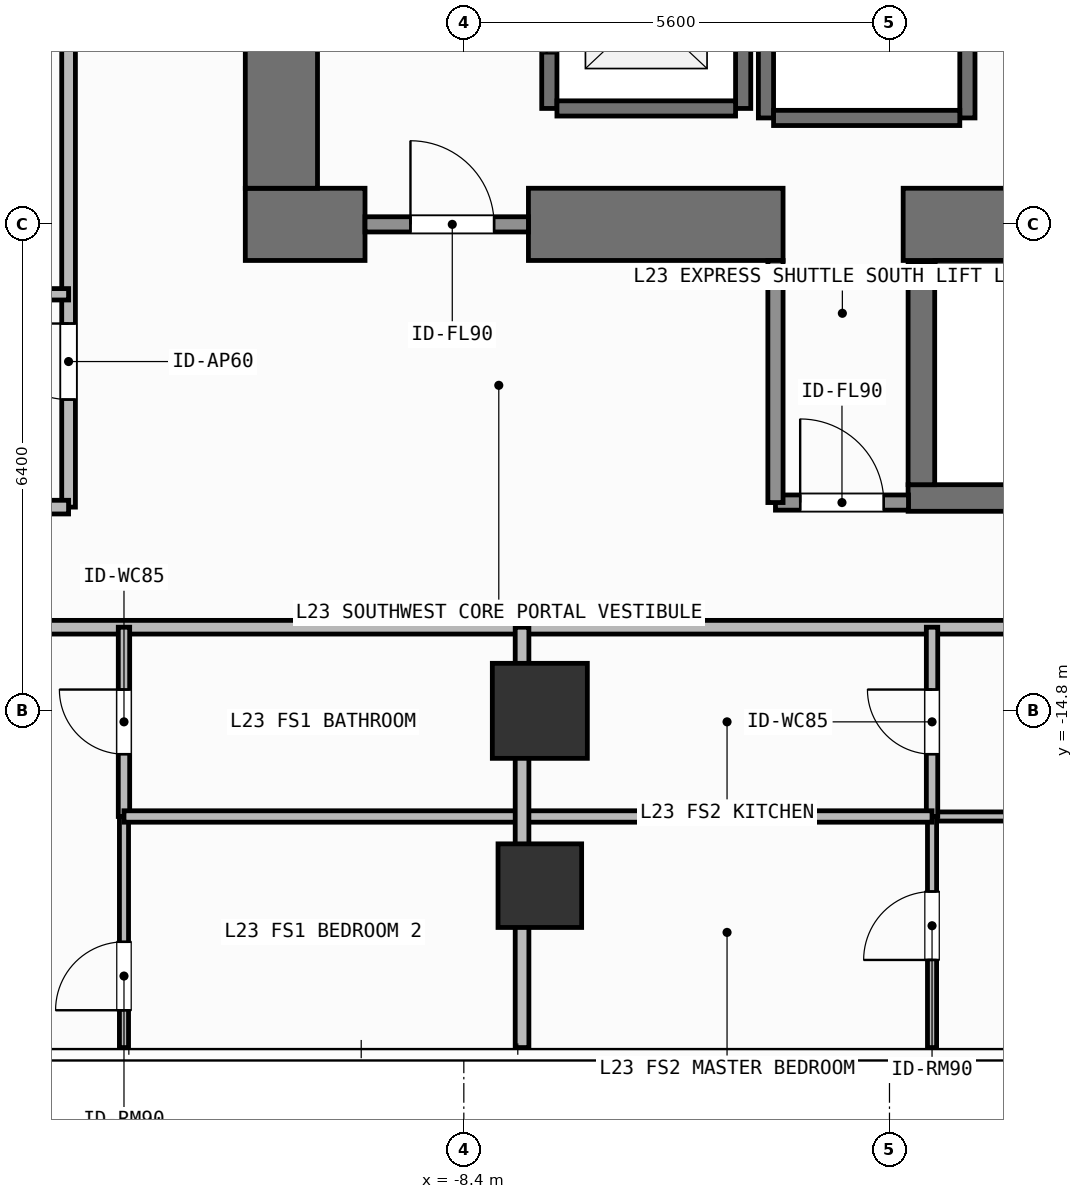
"""IFC4 building model, lengths in metres.
Left out: names, types, materials, properties, quantities, classifications, styles, units other than length and angle.
Written with IfcOpenShell. Run it as: python <this file> out.ifc"""

import sys

from ifc_helpers import new_model, si_unit, direction, frame, frame_2d, origin, origin_2d, place, context, subcontext, project, spatial, rectangle, extrude, element, fill, save


model = new_model("IFC4")
c1 = context("Model", 3, precision=1e-05, world=origin(), true_north=direction((0.0, 1.0)))
c2 = subcontext(c1, "Body", "Model", "MODEL_VIEW")
j1 = project(units=[si_unit("LENGTHUNIT", "METRE"), si_unit("PLANEANGLEUNIT", "RADIAN")], contexts=[c1])
p1 = place(None, origin())
s1 = spatial("IfcSite", under=j1, at=p1, CompositionType="ELEMENT")
p2 = place(p1, origin())
s2 = spatial("IfcBuilding", under=s1, at=p2, CompositionType="ELEMENT")
p3 = place(p2, frame((0.0, 0.0, 93.0)))
s3 = spatial("IfcBuildingStorey", under=s2, at=p3, CompositionType="ELEMENT", Elevation=93.0)
p4 = place(p3, frame((-11.275, -8.4, 0.0), z_axis=(0.0, 0.0, 1.0), x_axis=(1.0, 0.0, 0.0)))
e1 = element("IfcWall", 1, at=p4, inside=s3, PredefinedType="SHEAR", context=c2, shape_type="SweptSolid", body=[
    extrude(rectangle(XDim=1.575, YDim=0.95, at=frame_2d((0.788, 0.0))), origin(), (0.0, 0.0, 1.0), 3.9),
])
p5 = place(p3, frame((-7.55, -8.4, 0.0), z_axis=(0.0, 0.0, 1.0), x_axis=(1.0, 0.0, 0.0)))
e2 = element("IfcWall", 2, at=p5, inside=s3, PredefinedType="SHEAR", context=c2, shape_type="SweptSolid", body=[
    extrude(rectangle(XDim=3.35, YDim=0.95, at=frame_2d((1.675, 0.0))), origin(), (0.0, 0.0, 1.0), 3.9),
])
p6 = place(p3, frame((-2.62, -8.4, 0.0), z_axis=(0.0, 0.0, 1.0), x_axis=(1.0, 0.0, 0.0)))
e3 = element("IfcWall", 3, at=p6, inside=s3, PredefinedType="SHEAR", context=c2, shape_type="SweptSolid", body=[
    extrude(rectangle(XDim=7.27, YDim=0.95, at=frame_2d((3.635, 0.0))), origin(), (0.0, 0.0, 1.0), 3.9),
])
p7 = place(p3, frame((-10.8, -7.925, 0.0), z_axis=(0.0, 0.0, 1.0), x_axis=(0.0, 1.0, 0.0)))
e4 = element("IfcWall", 4, at=p7, inside=s3, PredefinedType="SHEAR", context=c2, shape_type="SweptSolid", body=[
    extrude(rectangle(XDim=15.85, YDim=0.95, at=frame_2d((7.925, 0.0))), origin(), (0.0, 0.0, 1.0), 3.9),
])
p8 = place(p3, frame((-2.555, -12.0, 0.0), z_axis=(0.0, 0.0, 1.0), x_axis=(1.0, 0.0, 0.0)))
e5 = element("IfcWall", 5, at=p8, inside=s3, PredefinedType="SHEAR", context=c2, shape_type="SweptSolid", body=[
    extrude(rectangle(XDim=7.31, YDim=0.35, at=frame_2d((3.655, 0.0))), origin(), (0.0, 0.0, 1.0), 3.9),
])
p9 = place(p3, frame((-2.2, -8.95, 0.0), z_axis=(0.0, 0.0, 1.0), x_axis=(1.0, 0.0, 0.0)))
e6 = element("IfcWall", 6, at=p9, inside=s3, PredefinedType="SHEAR", context=c2, shape_type="SweptSolid", body=[
    extrude(rectangle(XDim=6.6, YDim=0.15, at=frame_2d((3.3, 0.0))), origin(), (0.0, 0.0, 1.0), 3.9),
])
p10 = place(p3, frame((-2.38, -11.825, 0.0), z_axis=(0.0, 0.0, 1.0), x_axis=(0.0, 1.0, 0.0)))
e7 = element("IfcWall", 7, at=p10, inside=s3, PredefinedType="SHEAR", context=c2, shape_type="SweptSolid", body=[
    extrude(rectangle(XDim=2.925, YDim=0.35, at=frame_2d((1.462, 0.0))), origin(), (0.0, 0.0, 1.0), 3.9),
])
p11 = place(p3, frame((-7.4, -14.8, 0.0), z_axis=(0.0, 0.0, 1.0), x_axis=(1.0, 0.0, 0.0)))
e8 = element("IfcColumn", 8, at=p11, inside=s3, PredefinedType="COLUMN", context=c2, shape_type="SweptSolid", body=[
    extrude(rectangle(XDim=1.25, YDim=1.25, at=origin_2d()), origin(), (0.0, 0.0, 1.0), 3.9),
])
p12 = place(p3, frame((-7.4, -17.1, 0.0), z_axis=(0.0, 0.0, 1.0), x_axis=(1.0, 0.0, 0.0)))
e9 = element("IfcColumn", 9, at=p12, inside=s3, PredefinedType="COLUMN", context=c2, shape_type="SweptSolid", body=[
    extrude(rectangle(XDim=1.1, YDim=1.1, at=origin_2d()), origin(), (0.0, 0.0, 1.0), 3.9),
])
p13 = place(p3, frame((-7.275, -6.875, 0.0), z_axis=(0.0, 0.0, 1.0), x_axis=(0.0, 1.0, 0.0)))
e10 = element("IfcWall", 10, at=p13, inside=s3, PredefinedType="SHEAR", context=c2, shape_type="SweptSolid", body=[
    extrude(rectangle(XDim=2.55, YDim=0.2, at=frame_2d((1.275, 0.0))), origin(), (0.0, 0.0, 1.0), 3.68),
])
p14 = place(p13, frame((0.725, 0.0, 0.0)))
e11 = element("IfcOpeningElement", 11, at=p14, cuts=e10, PredefinedType="OPENING", context=c2, shape_type="SweptSolid", body=[
    extrude(rectangle(XDim=1.1, YDim=2.2, at=frame_2d((0.55, 1.1))), frame((0.0, 0.11, 0.0), z_axis=(0.0, -1.0, 0.0), x_axis=(1.0, 0.0, 0.0)), (0.0, 0.0, 1.0), 0.22),
])
p15 = place(p3, frame((-4.725, -6.875, 0.0), z_axis=(0.0, 0.0, 1.0), x_axis=(0.0, 1.0, 0.0)))
e12 = element("IfcWall", 12, at=p15, inside=s3, PredefinedType="SHEAR", context=c2, shape_type="SweptSolid", body=[
    extrude(rectangle(XDim=2.55, YDim=0.2, at=frame_2d((1.275, 0.0))), origin(), (0.0, 0.0, 1.0), 3.68),
])
p16 = place(p3, frame((-7.175, -6.875, 0.0), z_axis=(0.0, 0.0, 1.0), x_axis=(1.0, 0.0, 0.0)))
e13 = element("IfcWall", 13, at=p16, inside=s3, PredefinedType="SHEAR", context=c2, shape_type="SweptSolid", body=[
    extrude(rectangle(XDim=2.35, YDim=0.2, at=frame_2d((1.175, 0.0))), origin(), (0.0, 0.0, 1.0), 3.68),
])
for number, where, z_axis, x_axis in (
    (14, (-4.425, -7.0, 0.0), (0.0, 0.0, 1.0), (0.0, 1.0, 0.0)),
    (15, (-1.775, -7.0, 0.0), (0.0, 0.0, 1.0), (0.0, 1.0, 0.0)),
):
    element("IfcWall", number, at=place(p3, frame(where, z_axis=z_axis, x_axis=x_axis)), inside=s3, PredefinedType="SHEAR", context=c2, shape_type="SweptSolid", body=[
        extrude(rectangle(XDim=2.8, YDim=0.2, at=frame_2d((1.4, 0.0))), origin(), (0.0, 0.0, 1.0), 3.68),
    ])
p17 = place(p3, frame((-4.325, -7.0, 0.0), z_axis=(0.0, 0.0, 1.0), x_axis=(1.0, 0.0, 0.0)))
e16 = element("IfcWall", 16, at=p17, inside=s3, PredefinedType="SHEAR", context=c2, shape_type="SweptSolid", body=[
    extrude(rectangle(XDim=2.45, YDim=0.2, at=frame_2d((1.225, 0.0))), origin(), (0.0, 0.0, 1.0), 3.68),
])
p18 = place(p3, frame((-9.7, -8.4, 0.0), z_axis=(0.0, 0.0, 1.0), x_axis=(1.0, 0.0, 0.0)))
e17 = element("IfcWall", 17, at=p18, inside=s3, PredefinedType="SOLIDWALL", context=c2, shape_type="SweptSolid", body=[
    extrude(rectangle(XDim=2.15, YDim=0.2, at=frame_2d((1.075, 0.0))), origin(), (0.0, 0.0, 1.0), 2.72),
])
p19 = place(p18, frame((0.598, 0.0, 0.0)))
e18 = element("IfcOpeningElement", 18, at=p19, cuts=e17, PredefinedType="OPENING", context=c2, shape_type="SweptSolid", body=[
    extrude(rectangle(XDim=1.1, YDim=2.15, at=frame_2d((0.55, 1.075))), frame((0.0, 0.11, 0.0), z_axis=(0.0, -1.0, 0.0), x_axis=(1.0, 0.0, 0.0)), (0.0, 0.0, 1.0), 0.22),
])
p20 = place(p3, frame((-4.3, -12.06, 0.0), z_axis=(0.0, 0.0, 1.0), x_axis=(1.0, 0.0, 0.0)))
e19 = element("IfcWall", 19, at=p20, inside=s3, PredefinedType="SOLIDWALL", context=c2, shape_type="SweptSolid", body=[
    extrude(rectangle(XDim=1.75, YDim=0.2, at=frame_2d((0.875, 0.0))), origin(), (0.0, 0.0, 1.0), 3.68),
])
p21 = place(p20, frame((0.325, 0.0, 0.0)))
e20 = element("IfcOpeningElement", 20, at=p21, cuts=e19, PredefinedType="OPENING", context=c2, shape_type="SweptSolid", body=[
    extrude(rectangle(XDim=1.1, YDim=2.15, at=frame_2d((0.55, 1.075))), frame((0.0, 0.11, 0.0), z_axis=(0.0, -1.0, 0.0), x_axis=(1.0, 0.0, 0.0)), (0.0, 0.0, 1.0), 0.22),
])
p22 = place(p3, frame((-24.42, -13.7, 0.0), z_axis=(0.0, 0.0, 1.0), x_axis=(1.0, 0.0, 0.0)))
e21 = element("IfcWall", 21, at=p22, inside=s3, PredefinedType="PARTITIONING", context=c2, shape_type="SweptSolid", body=[
    extrude(rectangle(XDim=16.786, YDim=0.18, at=frame_2d((8.393, 0.0))), origin(), (0.0, 0.0, 1.0), 3.68),
])
p23 = place(p22, frame((7.174, 0.0, 0.0)))
e22 = element("IfcOpeningElement", 22, at=p23, cuts=e21, PredefinedType="OPENING", context=c2, shape_type="SweptSolid", body=[
    extrude(rectangle(XDim=1.0, YDim=2.2, at=frame_2d((0.5, 1.1))), frame((0.0, 0.1, 0.0), z_axis=(0.0, -1.0, 0.0), x_axis=(1.0, 0.0, 0.0)), (0.0, 0.0, 1.0), 0.2),
])
p24 = place(p3, frame((-12.871, -16.19, 0.0), z_axis=(0.0, 0.0, 1.0), x_axis=(0.0, 1.0, 0.0)))
e23 = element("IfcWall", 23, at=p24, inside=s3, PredefinedType="PARTITIONING", context=c2, shape_type="SweptSolid", body=[
    extrude(rectangle(XDim=2.49, YDim=0.15, at=frame_2d((1.245, 0.0))), origin(), (0.0, 0.0, 1.0), 3.68),
])
p25 = place(p24, frame((0.82, 0.0, 0.0)))
e24 = element("IfcOpeningElement", 24, at=p25, cuts=e23, PredefinedType="OPENING", context=c2, shape_type="SweptSolid", body=[
    extrude(rectangle(XDim=0.85, YDim=2.1, at=frame_2d((0.425, 1.05))), frame((0.0, 0.085, 0.0), z_axis=(0.0, -1.0, 0.0), x_axis=(1.0, 0.0, 0.0)), (0.0, 0.0, 1.0), 0.17),
])
p26 = place(p3, frame((-12.871, -19.23, 0.0), z_axis=(0.0, 0.0, 1.0), x_axis=(0.0, 1.0, 0.0)))
e25 = element("IfcWall", 25, at=p26, inside=s3, PredefinedType="PARTITIONING", context=c2, shape_type="SweptSolid", body=[
    extrude(rectangle(XDim=3.04, YDim=0.12, at=frame_2d((1.52, 0.0))), origin(), (0.0, 0.0, 1.0), 3.68),
])
p27 = place(p26, frame((0.491, 0.0, 0.0)))
e26 = element("IfcOpeningElement", 26, at=p27, cuts=e25, PredefinedType="OPENING", context=c2, shape_type="SweptSolid", body=[
    extrude(rectangle(XDim=0.9, YDim=2.1, at=frame_2d((0.45, 1.05))), frame((0.0, 0.07, 0.0), z_axis=(0.0, -1.0, 0.0), x_axis=(1.0, 0.0, 0.0)), (0.0, 0.0, 1.0), 0.14),
])
p28 = place(p3, frame((-7.634, -13.7, 0.0), z_axis=(0.0, 0.0, 1.0), x_axis=(1.0, 0.0, 0.0)))
e27 = element("IfcWall", 27, at=p28, inside=s3, PredefinedType="PARTITIONING", context=c2, shape_type="SweptSolid", body=[
    extrude(rectangle(XDim=26.254, YDim=0.18, at=frame_2d((13.127, 0.0))), origin(), (0.0, 0.0, 1.0), 3.68),
])
p29 = place(p28, frame((12.178, 0.0, 0.0)))
e28 = element("IfcOpeningElement", 28, at=p29, cuts=e27, PredefinedType="OPENING", context=c2, shape_type="SweptSolid", body=[
    extrude(rectangle(XDim=1.0, YDim=2.2, at=frame_2d((0.5, 1.1))), frame((0.0, 0.1, 0.0), z_axis=(0.0, -1.0, 0.0), x_axis=(1.0, 0.0, 0.0)), (0.0, 0.0, 1.0), 0.2),
])
p30 = place(p3, frame((-2.24, -16.19, 0.0), z_axis=(0.0, 0.0, 1.0), x_axis=(1.0, 0.0, 0.0)))
e29 = element("IfcWall", 29, at=p30, inside=s3, PredefinedType="PARTITIONING", context=c2, shape_type="SweptSolid", body=[
    extrude(rectangle(XDim=14.654, YDim=0.12, at=frame_2d((7.327, 0.0))), origin(), (0.0, 0.0, 1.0), 3.68),
])
p31 = place(p30, frame((6.787, 0.0, 0.0)))
e30 = element("IfcOpeningElement", 30, at=p31, cuts=e29, PredefinedType="OPENING", context=c2, shape_type="SweptSolid", body=[
    extrude(rectangle(XDim=0.9, YDim=2.1, at=frame_2d((0.45, 1.05))), frame((0.0, 0.07, 0.0), z_axis=(0.0, -1.0, 0.0), x_axis=(1.0, 0.0, 0.0)), (0.0, 0.0, 1.0), 0.14),
])
p32 = place(p3, frame((-2.24, -16.19, 0.0), z_axis=(0.0, 0.0, 1.0), x_axis=(0.0, 1.0, 0.0)))
e31 = element("IfcWall", 31, at=p32, inside=s3, PredefinedType="PARTITIONING", context=c2, shape_type="SweptSolid", body=[
    extrude(rectangle(XDim=2.49, YDim=0.15, at=frame_2d((1.245, 0.0))), origin(), (0.0, 0.0, 1.0), 3.68),
])
p33 = place(p32, frame((0.82, 0.0, 0.0)))
e32 = element("IfcOpeningElement", 32, at=p33, cuts=e31, PredefinedType="OPENING", context=c2, shape_type="SweptSolid", body=[
    extrude(rectangle(XDim=0.85, YDim=2.1, at=frame_2d((0.425, 1.05))), frame((0.0, 0.085, 0.0), z_axis=(0.0, -1.0, 0.0), x_axis=(1.0, 0.0, 0.0)), (0.0, 0.0, 1.0), 0.17),
])
p34 = place(p3, frame((-2.24, -19.23, 0.0), z_axis=(0.0, 0.0, 1.0), x_axis=(0.0, 1.0, 0.0)))
e33 = element("IfcWall", 33, at=p34, inside=s3, PredefinedType="PARTITIONING", context=c2, shape_type="SweptSolid", body=[
    extrude(rectangle(XDim=3.04, YDim=0.12, at=frame_2d((1.52, 0.0))), origin(), (0.0, 0.0, 1.0), 3.68),
])
p35 = place(p34, frame((1.153, 0.0, 0.0)))
e34 = element("IfcOpeningElement", 34, at=p35, cuts=e33, PredefinedType="OPENING", context=c2, shape_type="SweptSolid", body=[
    extrude(rectangle(XDim=0.9, YDim=2.1, at=frame_2d((0.45, 1.05))), frame((0.0, 0.07, 0.0), z_axis=(0.0, -1.0, 0.0), x_axis=(1.0, 0.0, 0.0)), (0.0, 0.0, 1.0), 0.14),
])
p36 = place(p3, frame((-13.6, -12.12, 0.0), z_axis=(0.0, 0.0, 1.0), x_axis=(0.0, 1.0, 0.0)))
e35 = element("IfcWall", 35, at=p36, inside=s3, PredefinedType="PARTITIONING", context=c2, shape_type="SweptSolid", body=[
    extrude(rectangle(XDim=9.389, YDim=0.18, at=frame_2d((4.695, 0.0))), origin(), (0.0, 0.0, 1.0), 3.68),
])
p37 = place(p36, frame((1.415, 0.0, 0.0)))
e36 = element("IfcOpeningElement", 36, at=p37, cuts=e35, PredefinedType="OPENING", context=c2, shape_type="SweptSolid", body=[
    extrude(rectangle(XDim=1.0, YDim=2.2, at=frame_2d((0.5, 1.1))), frame((0.0, 0.1, 0.0), z_axis=(0.0, -1.0, 0.0), x_axis=(1.0, 0.0, 0.0)), (0.0, 0.0, 1.0), 0.2),
])
p38 = place(p3, frame((-16.863, -9.32, 0.0), z_axis=(0.0, 0.0, 1.0), x_axis=(1.0, 0.0, 0.0)))
e37 = element("IfcWall", 37, at=p38, inside=s3, PredefinedType="PARTITIONING", context=c2, shape_type="SweptSolid", body=[
    extrude(rectangle(XDim=3.263, YDim=0.15, at=frame_2d((1.631, 0.0))), origin(), (0.0, 0.0, 1.0), 3.68),
])
p39 = place(p38, frame((0.509, 0.0, 0.0)))
e38 = element("IfcOpeningElement", 38, at=p39, cuts=e37, PredefinedType="OPENING", context=c2, shape_type="SweptSolid", body=[
    extrude(rectangle(XDim=0.85, YDim=2.1, at=frame_2d((0.425, 1.05))), frame((0.0, 0.085, 0.0), z_axis=(0.0, -1.0, 0.0), x_axis=(1.0, 0.0, 0.0)), (0.0, 0.0, 1.0), 0.17),
])
p40 = place(p3, frame((-4.3, -12.06, 0.0), z_axis=(0.0, 0.0, 1.0), x_axis=(0.0, 1.0, 0.0)))
e39 = element("IfcWall", 39, at=p40, inside=s3, PredefinedType="SOLIDWALL", context=c2, shape_type="SweptSolid", body=[
    extrude(rectangle(XDim=3.185, YDim=0.2, at=frame_2d((1.593, 0.0))), origin(), (0.0, 0.0, 1.0), 3.68),
])
p41 = place(p3, frame((-12.871, -16.19, 0.0), z_axis=(0.0, 0.0, 1.0), x_axis=(1.0, 0.0, 0.0)))
e40 = element("IfcWall", 40, at=p41, inside=s3, PredefinedType="PARTITIONING", context=c2, shape_type="SweptSolid", body=[
    extrude(rectangle(XDim=5.237, YDim=0.15, at=frame_2d((2.619, 0.0))), origin(), (0.0, 0.0, 1.0), 3.68),
])
p42 = place(p3, frame((-7.634, -16.19, 0.0), z_axis=(0.0, 0.0, 1.0), x_axis=(1.0, 0.0, 0.0)))
e41 = element("IfcWall", 41, at=p42, inside=s3, PredefinedType="PARTITIONING", context=c2, shape_type="SweptSolid", body=[
    extrude(rectangle(XDim=5.394, YDim=0.15, at=frame_2d((2.697, 0.0))), origin(), (0.0, 0.0, 1.0), 3.68),
])
p43 = place(p3, frame((-7.634, -19.23, 0.0), z_axis=(0.0, 0.0, 1.0), x_axis=(0.0, 1.0, 0.0)))
e42 = element("IfcWall", 42, at=p43, inside=s3, PredefinedType="PARTITIONING", context=c2, shape_type="SweptSolid", body=[
    extrude(rectangle(XDim=5.53, YDim=0.18, at=frame_2d((2.765, 0.0))), origin(), (0.0, 0.0, 1.0), 3.082),
])
p44 = place(p3, frame((-27.93, -12.12, 0.0), z_axis=(0.0, 0.0, 1.0), x_axis=(1.0, 0.0, 0.0)))
e43 = element("IfcWall", 43, at=p44, inside=s3, PredefinedType="PARTITIONING", context=c2, shape_type="SweptSolid", body=[
    extrude(rectangle(XDim=14.33, YDim=0.18, at=frame_2d((7.165, 0.0))), origin(), (0.0, 0.0, 1.0), 3.68),
])
p45 = place(p14, origin())
e44 = element("IfcDoor", 44, at=p45, inside=s3, OperationType="SLIDING_TO_LEFT", PredefinedType="DOOR", context=c2, shape_type="SweptSolid", body=[
    extrude(rectangle(XDim=1.1, YDim=2.2, at=frame_2d((0.55, 1.1))), frame((0.0, 0.025, 0.0), z_axis=(0.0, -1.0, 0.0), x_axis=(1.0, 0.0, 0.0)), (0.0, 0.0, 1.0), 0.05),
])
fill(e11, e44)
p46 = place(p19, origin())
e45 = element("IfcDoor", 45, at=p46, inside=s3, OperationType="SINGLE_SWING_LEFT", PredefinedType="DOOR", context=c2, shape_type="SweptSolid", body=[
    extrude(rectangle(XDim=1.1, YDim=2.15, at=frame_2d((0.55, 1.075))), frame((0.0, 0.025, 0.0), z_axis=(0.0, -1.0, 0.0), x_axis=(1.0, 0.0, 0.0)), (0.0, 0.0, 1.0), 0.05),
])
fill(e18, e45)
p47 = place(p21, origin())
e46 = element("IfcDoor", 46, at=p47, inside=s3, OperationType="SINGLE_SWING_LEFT", PredefinedType="DOOR", context=c2, shape_type="SweptSolid", body=[
    extrude(rectangle(XDim=1.1, YDim=2.15, at=frame_2d((0.55, 1.075))), frame((0.0, 0.025, 0.0), z_axis=(0.0, -1.0, 0.0), x_axis=(1.0, 0.0, 0.0)), (0.0, 0.0, 1.0), 0.05),
])
fill(e20, e46)
p48 = place(p25, origin())
e47 = element("IfcDoor", 47, at=p48, inside=s3, OperationType="SINGLE_SWING_RIGHT", PredefinedType="DOOR", context=c2, shape_type="SweptSolid", body=[
    extrude(rectangle(XDim=0.85, YDim=2.1, at=frame_2d((0.425, 1.05))), frame((0.0, 0.025, 0.0), z_axis=(0.0, -1.0, 0.0), x_axis=(1.0, 0.0, 0.0)), (0.0, 0.0, 1.0), 0.05),
])
fill(e24, e47)
p49 = place(p27, origin())
e48 = element("IfcDoor", 48, at=p49, inside=s3, OperationType="SINGLE_SWING_LEFT", PredefinedType="DOOR", context=c2, shape_type="SweptSolid", body=[
    extrude(rectangle(XDim=0.9, YDim=2.1, at=frame_2d((0.45, 1.05))), frame((0.0, 0.025, 0.0), z_axis=(0.0, -1.0, 0.0), x_axis=(1.0, 0.0, 0.0)), (0.0, 0.0, 1.0), 0.05),
])
fill(e26, e48)
p50 = place(p33, origin())
e49 = element("IfcDoor", 49, at=p50, inside=s3, OperationType="SINGLE_SWING_RIGHT", PredefinedType="DOOR", context=c2, shape_type="SweptSolid", body=[
    extrude(rectangle(XDim=0.85, YDim=2.1, at=frame_2d((0.425, 1.05))), frame((0.0, 0.025, 0.0), z_axis=(0.0, -1.0, 0.0), x_axis=(1.0, 0.0, 0.0)), (0.0, 0.0, 1.0), 0.05),
])
fill(e32, e49)
p51 = place(p35, origin())
e50 = element("IfcDoor", 50, at=p51, inside=s3, OperationType="SINGLE_SWING_LEFT", PredefinedType="DOOR", context=c2, shape_type="SweptSolid", body=[
    extrude(rectangle(XDim=0.9, YDim=2.1, at=frame_2d((0.45, 1.05))), frame((0.0, 0.025, 0.0), z_axis=(0.0, -1.0, 0.0), x_axis=(1.0, 0.0, 0.0)), (0.0, 0.0, 1.0), 0.05),
])
fill(e34, e50)
p52 = place(p37, origin())
e51 = element("IfcDoor", 51, at=p52, inside=s3, OperationType="SINGLE_SWING_RIGHT", PredefinedType="DOOR", context=c2, shape_type="SweptSolid", body=[
    extrude(rectangle(XDim=1.0, YDim=2.2, at=frame_2d((0.5, 1.1))), frame((0.0, 0.025, 0.0), z_axis=(0.0, -1.0, 0.0), x_axis=(1.0, 0.0, 0.0)), (0.0, 0.0, 1.0), 0.05),
])
fill(e36, e51)
save(model, sys.argv[1])
